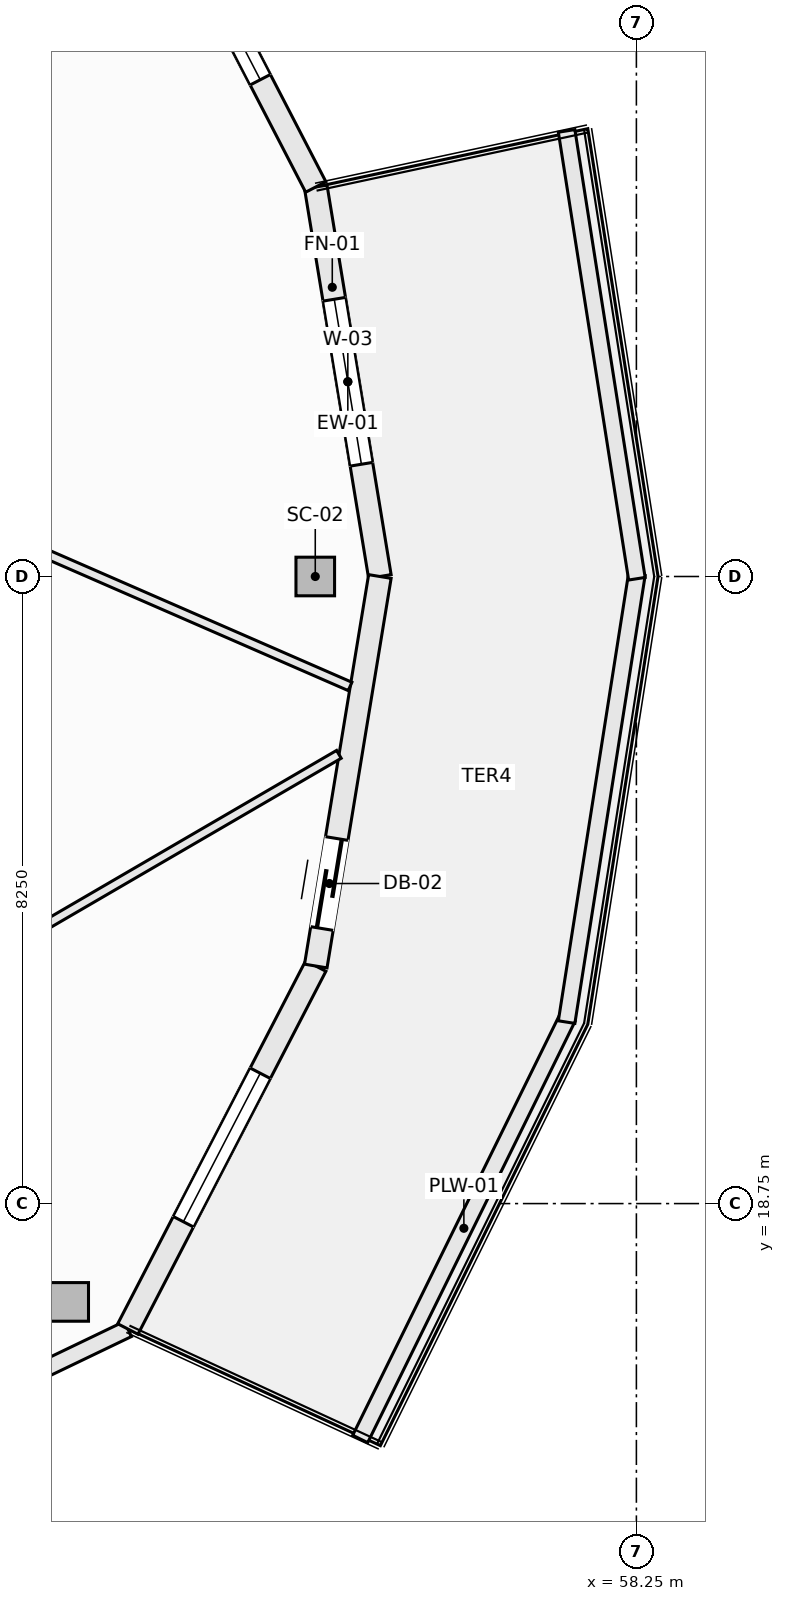
"""IFC4 building model, lengths in metres.
Left out: names, types, materials, properties, quantities, classifications, styles, units other than length and angle.
Written with IfcOpenShell. Run it as: python <this file> out.ifc"""

import sys

from ifc_helpers import new_model, si_unit, direction, frame, frame_2d, origin, origin_2d, place, context, subcontext, project, spatial, rectangle, hollow_rectangle, extrude, element, fill, save


model = new_model("IFC4")
c1 = context("Model", 3, precision=1e-05, world=origin(), true_north=direction((0.0, 1.0)))
c2 = subcontext(c1, "Body", "Model", "MODEL_VIEW")
j1 = project(units=[si_unit("LENGTHUNIT", "METRE"), si_unit("PLANEANGLEUNIT", "RADIAN")], contexts=[c1])
p1 = place(None, origin())
s1 = spatial("IfcSite", under=j1, at=p1, CompositionType="ELEMENT")
p2 = place(p1, origin())
s2 = spatial("IfcBuilding", under=s1, at=p2, CompositionType="ELEMENT")
p3 = place(p2, frame((0.0, 0.0, 226.1)))
s3 = spatial("IfcBuildingStorey", under=s2, at=p3, CompositionType="ELEMENT", Elevation=226.1)
for number, where, z_axis, x_axis in (
    (1, (54.025, 27.0, -0.27), (0.0, 0.0, 1.0), (1.0, 0.0, 0.0)),
    (2, (50.787, 17.456, -0.27), (0.0, 0.0, 1.0), (1.0, 0.0, 0.0)),
):
    element("IfcColumn", number, at=place(p3, frame(where, z_axis=z_axis, x_axis=x_axis)), inside=s3, PredefinedType="COLUMN", context=c2, shape_type="SweptSolid", body=[
        extrude(hollow_rectangle(XDim=0.508, YDim=0.508, WallThickness=0.019, at=origin_2d()), origin(), (0.0, 0.0, 1.0), 3.3),
    ])
p4 = place(p3, frame((54.032, 32.125, 0.0), z_axis=(0.0, 0.0, 1.0), x_axis=(0.16237087798, -0.986729799886, 0.0)))
e3 = element("IfcWall", 3, at=p4, inside=s3, PredefinedType="SOLIDWALL", context=c2, shape_type="SweptSolid", body=[
    extrude(rectangle(XDim=5.193, YDim=0.3, at=frame_2d((2.597, 0.0))), origin(), (0.0, 0.0, 1.0), 2.605),
])
p5 = place(p4, frame((1.497, 0.0, 0.72)))
e4 = element("IfcOpeningElement", 4, at=p5, cuts=e3, PredefinedType="OPENING", context=c2, shape_type="SweptSolid", body=[
    extrude(rectangle(XDim=2.2, YDim=1.65, at=frame_2d((1.1, 0.825))), frame((0.0, 0.16, 0.0), z_axis=(0.0, -1.0, 0.0), x_axis=(1.0, 0.0, 0.0)), (0.0, 0.0, 1.0), 0.32),
])
p6 = place(p3, frame((51.559, 36.9, 0.0), z_axis=(0.0, 0.0, 1.0), x_axis=(0.459808219482, -0.888018243786, 0.0)))
e5 = element("IfcWall", 5, at=p6, inside=s3, PredefinedType="SOLIDWALL", context=c2, shape_type="SweptSolid", body=[
    extrude(rectangle(XDim=5.378, YDim=0.3, at=frame_2d((2.689, 0.0))), origin(), (0.0, 0.0, 1.0), 2.605),
])
p7 = place(p6, frame((1.589, 0.0, 0.72)))
e6 = element("IfcOpeningElement", 6, at=p7, cuts=e5, PredefinedType="OPENING", context=c2, shape_type="SweptSolid", body=[
    extrude(rectangle(XDim=2.2, YDim=1.65, at=frame_2d((1.1, 0.825))), frame((0.0, 0.16, 0.0), z_axis=(0.0, -1.0, 0.0), x_axis=(1.0, 0.0, 0.0)), (0.0, 0.0, 1.0), 0.32),
])
p8 = place(p3, frame((50.494, 16.588, 0.0), z_axis=(0.0, 0.0, 1.0), x_axis=(0.901342408365, 0.433107218692, 0.0)))
e7 = element("IfcWall", 7, at=p8, inside=s3, PredefinedType="SOLIDWALL", context=c2, shape_type="SweptSolid", body=[
    extrude(rectangle(XDim=1.181, YDim=0.22, at=frame_2d((0.591, 0.0))), origin(), (0.0, 0.0, 1.0), 2.605),
])
p9 = place(p3, frame((51.559, 17.1, 0.0), z_axis=(0.0, 0.0, 1.0), x_axis=(0.459808219482, 0.888018243786, 0.0)))
e8 = element("IfcWall", 8, at=p9, inside=s3, PredefinedType="SOLIDWALL", context=c2, shape_type="SweptSolid", body=[
    extrude(rectangle(XDim=5.378, YDim=0.3, at=frame_2d((2.689, 0.0))), origin(), (0.0, 0.0, 1.0), 2.605),
])
p10 = place(p9, frame((1.589, 0.0, 0.72)))
e9 = element("IfcOpeningElement", 9, at=p10, cuts=e8, PredefinedType="OPENING", context=c2, shape_type="SweptSolid", body=[
    extrude(rectangle(XDim=2.2, YDim=1.65, at=frame_2d((1.1, 0.825))), frame((0.0, 0.16, 0.0), z_axis=(0.0, -1.0, 0.0), x_axis=(1.0, 0.0, 0.0)), (0.0, 0.0, 1.0), 0.32),
])
p11 = place(p3, frame((54.032, 21.875, 0.0), z_axis=(0.0, 0.0, 1.0), x_axis=(0.16237087798, 0.986729799886, 0.0)))
e10 = element("IfcWall", 10, at=p11, inside=s3, PredefinedType="SOLIDWALL", context=c2, shape_type="SweptSolid", body=[
    extrude(rectangle(XDim=5.193, YDim=0.3, at=frame_2d((2.597, 0.0))), origin(), (0.0, 0.0, 1.0), 2.605),
])
p12 = place(p11, frame((0.5, 0.0, 0.0)))
e11 = element("IfcOpeningElement", 11, at=p12, cuts=e10, PredefinedType="OPENING", context=c2, shape_type="SweptSolid", body=[
    extrude(rectangle(XDim=1.2, YDim=2.2, at=frame_2d((0.6, 1.1))), frame((0.0, 0.16, 0.0), z_axis=(0.0, -1.0, 0.0), x_axis=(1.0, 0.0, 0.0)), (0.0, 0.0, 1.0), 0.32),
])
p13 = place(p3, frame((54.616, 15.653, 0.0), z_axis=(0.0, 0.0, 1.0), x_axis=(0.441640961804, 0.897191875162, 0.0)))
e12 = element("IfcWall", 12, at=p13, inside=s3, PredefinedType="PARAPET", context=c2, shape_type="SweptSolid", body=[
    extrude(rectangle(XDim=6.178, YDim=0.22, at=frame_2d((3.089, 0.0))), origin(), (0.0, 0.0, 1.0), 0.52),
])
for number, where, z_axis, x_axis in (
    (13, (57.332, 21.138, 0.0), (0.0, 0.0, 1.0), (0.155, 0.988, 0.0)),
    (14, (57.332, 32.862, 0.0), (0.0, 0.0, 1.0), (0.155, -0.988, 0.0)),
):
    element("IfcWall", number, at=place(p3, frame(where, z_axis=z_axis, x_axis=x_axis)), inside=s3, PredefinedType="PARAPET", context=c2, shape_type="SweptSolid", body=[
        extrude(rectangle(XDim=5.964, YDim=0.22, at=frame_2d((2.982, 0.0))), origin(), (0.0, 0.0, 1.0), 0.52),
    ])
p14 = place(p3, frame((43.773, 18.512, 0.0), z_axis=(0.0, 0.0, 1.0), x_axis=(0.864261022419, 0.503043621495, 0.0)))
e15 = element("IfcWall", 15, at=p14, inside=s3, PredefinedType="PARTITIONING", context=c2, shape_type="SweptSolid", body=[
    extrude(rectangle(XDim=12.222, YDim=0.12, at=frame_2d((6.111, 0.0))), origin(), (0.0, 0.0, 1.0), 3.03),
])
p15 = place(p3, frame((41.582, 31.18, 0.0), z_axis=(0.0, 0.0, 1.0), x_axis=(0.916624100851, -0.399750244202, 0.0)))
e16 = element("IfcWall", 16, at=p15, inside=s3, PredefinedType="PARTITIONING", context=c2, shape_type="SweptSolid", body=[
    extrude(rectangle(XDim=14.074, YDim=0.12, at=frame_2d((7.037, 0.0))), origin(), (0.0, 0.0, 1.0), 2.478),
])
p16 = place(p5, origin())
e17 = element("IfcWindow", 17, at=p16, inside=s3, PartitioningType="SINGLE_PANEL", PredefinedType="WINDOW", context=c2, shape_type="SweptSolid", body=[
    extrude(rectangle(XDim=2.2, YDim=1.65, at=frame_2d((1.1, 0.825))), frame((0.0, 0.03, 0.0), z_axis=(0.0, -1.0, 0.0), x_axis=(1.0, 0.0, 0.0)), (0.0, 0.0, 1.0), 0.06),
])
fill(e4, e17)
p17 = place(p7, origin())
e18 = element("IfcWindow", 18, at=p17, inside=s3, PartitioningType="SINGLE_PANEL", PredefinedType="WINDOW", context=c2, shape_type="SweptSolid", body=[
    extrude(rectangle(XDim=2.2, YDim=1.65, at=frame_2d((1.1, 0.825))), frame((0.0, 0.03, 0.0), z_axis=(0.0, -1.0, 0.0), x_axis=(1.0, 0.0, 0.0)), (0.0, 0.0, 1.0), 0.06),
])
fill(e6, e18)
p18 = place(p10, origin())
e19 = element("IfcWindow", 19, at=p18, inside=s3, PartitioningType="SINGLE_PANEL", PredefinedType="WINDOW", context=c2, shape_type="SweptSolid", body=[
    extrude(rectangle(XDim=2.2, YDim=1.65, at=frame_2d((1.1, 0.825))), frame((0.0, 0.03, 0.0), z_axis=(0.0, -1.0, 0.0), x_axis=(1.0, 0.0, 0.0)), (0.0, 0.0, 1.0), 0.06),
])
fill(e9, e19)
p19 = place(p12, frame((1.2, 0.0, 0.0), z_axis=(0.0, 0.0, 1.0), x_axis=(-1.0, 0.0, 0.0)))
e20 = element("IfcDoor", 20, at=p19, inside=s3, OperationType="SLIDING_TO_LEFT", PredefinedType="DOOR", context=c2, shape_type="SweptSolid", body=[
    extrude(rectangle(XDim=1.2, YDim=2.2, at=frame_2d((0.6, 1.1))), frame((0.0, 0.025, 0.0), z_axis=(0.0, -1.0, 0.0), x_axis=(1.0, 0.0, 0.0)), (0.0, 0.0, 1.0), 0.05),
])
fill(e11, e20)
save(model, sys.argv[1])
